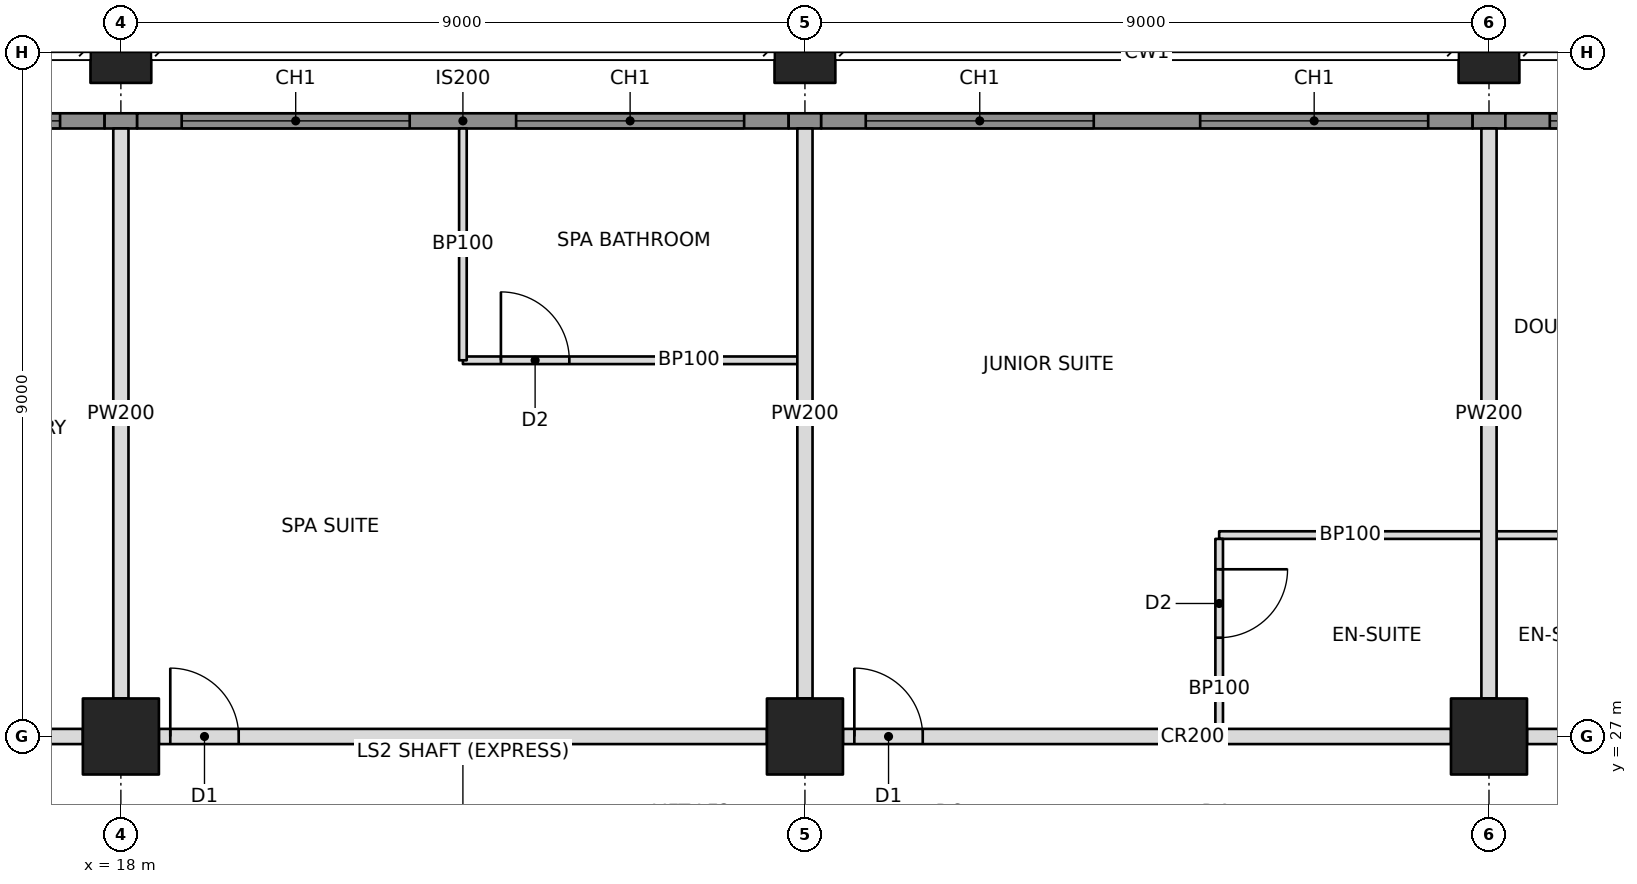
"""IFC4 building model, lengths in metres.
Left out: names, types, materials, properties, quantities, classifications, styles, units other than length and angle.
Written with IfcOpenShell. Run it as: python <this file> out.ifc"""

import sys

from ifc_helpers import new_model, si_unit, direction, frame, frame_2d, origin, origin_2d, place, context, subcontext, project, spatial, rectangle, hollow_rectangle, extrude, element, fill, save


model = new_model("IFC4")
c1 = context("Model", 3, precision=1e-05, world=origin(), true_north=direction((0.0, 1.0)))
c2 = subcontext(c1, "Body", "Model", "MODEL_VIEW")
j1 = project(units=[si_unit("LENGTHUNIT", "METRE"), si_unit("PLANEANGLEUNIT", "RADIAN")], contexts=[c1])
p1 = place(None, origin())
s1 = spatial("IfcSite", under=j1, at=p1, CompositionType="ELEMENT")
p2 = place(p1, origin())
s2 = spatial("IfcBuilding", under=s1, at=p2, CompositionType="ELEMENT")
p3 = place(p2, frame((0.0, 0.0, 85.8)))
s3 = spatial("IfcBuildingStorey", under=s2, at=p3, CompositionType="ELEMENT", Elevation=85.8)
p4 = place(p3, frame((18.0, 27.0, 0.0), z_axis=(0.0, 0.0, 1.0), x_axis=(1.0, 0.0, 0.0)))
e1 = element("IfcColumn", 1, at=p4, inside=s3, PredefinedType="COLUMN", context=c2, shape_type="SweptSolid", body=[
    extrude(hollow_rectangle(XDim=1.0, YDim=1.0, WallThickness=0.1, at=origin_2d()), origin(), (0.0, 0.0, 1.0), 3.4),
])
p5 = place(p3, frame((18.0, 36.0, 0.0), z_axis=(0.0, 0.0, 1.0), x_axis=(1.0, 0.0, 0.0)))
e2 = element("IfcColumn", 2, at=p5, inside=s3, PredefinedType="COLUMN", context=c2, shape_type="SweptSolid", body=[
    extrude(hollow_rectangle(XDim=0.8, YDim=0.8, WallThickness=0.07, at=origin_2d()), origin(), (0.0, 0.0, 1.0), 3.4),
])
p6 = place(p3, frame((27.0, 27.0, 0.0), z_axis=(0.0, 0.0, 1.0), x_axis=(1.0, 0.0, 0.0)))
e3 = element("IfcColumn", 3, at=p6, inside=s3, PredefinedType="COLUMN", context=c2, shape_type="SweptSolid", body=[
    extrude(hollow_rectangle(XDim=1.0, YDim=1.0, WallThickness=0.1, at=origin_2d()), origin(), (0.0, 0.0, 1.0), 3.4),
])
p7 = place(p3, frame((27.0, 36.0, 0.0), z_axis=(0.0, 0.0, 1.0), x_axis=(1.0, 0.0, 0.0)))
e4 = element("IfcColumn", 4, at=p7, inside=s3, PredefinedType="COLUMN", context=c2, shape_type="SweptSolid", body=[
    extrude(hollow_rectangle(XDim=0.8, YDim=0.8, WallThickness=0.07, at=origin_2d()), origin(), (0.0, 0.0, 1.0), 3.4),
])
p8 = place(p3, frame((36.0, 27.0, 0.0), z_axis=(0.0, 0.0, 1.0), x_axis=(1.0, 0.0, 0.0)))
e5 = element("IfcColumn", 5, at=p8, inside=s3, PredefinedType="COLUMN", context=c2, shape_type="SweptSolid", body=[
    extrude(hollow_rectangle(XDim=1.0, YDim=1.0, WallThickness=0.1, at=origin_2d()), origin(), (0.0, 0.0, 1.0), 3.4),
])
p9 = place(p3, frame((36.0, 36.0, 0.0), z_axis=(0.0, 0.0, 1.0), x_axis=(1.0, 0.0, 0.0)))
e6 = element("IfcColumn", 6, at=p9, inside=s3, PredefinedType="COLUMN", context=c2, shape_type="SweptSolid", body=[
    extrude(hollow_rectangle(XDim=0.8, YDim=0.8, WallThickness=0.07, at=origin_2d()), origin(), (0.0, 0.0, 1.0), 3.4),
])
p10 = place(p3, frame((9.5, 27.0, 0.0), z_axis=(0.0, 0.0, 1.0), x_axis=(1.0, 0.0, 0.0)))
e7 = element("IfcWall", 7, at=p10, inside=s3, PredefinedType="PARTITIONING", context=c2, shape_type="SweptSolid", body=[
    extrude(rectangle(XDim=8.0, YDim=0.2, at=frame_2d((4.0, 0.0))), origin(), (0.0, 0.0, 1.0), 2.21),
])
p11 = place(p10, frame((2.85, 0.0, 0.0)))
e8 = element("IfcOpeningElement", 8, at=p11, cuts=e7, PredefinedType="OPENING", context=c2, shape_type="SweptSolid", body=[
    extrude(rectangle(XDim=0.9, YDim=2.1, at=frame_2d((0.45, 1.05))), frame((0.0, 0.11, 0.0), z_axis=(0.0, -1.0, 0.0), x_axis=(1.0, 0.0, 0.0)), (0.0, 0.0, 1.0), 0.22),
])
p12 = place(p10, frame((4.25, 0.0, 0.0)))
e9 = element("IfcOpeningElement", 9, at=p12, cuts=e7, PredefinedType="OPENING", context=c2, shape_type="SweptSolid", body=[
    extrude(rectangle(XDim=1.0, YDim=2.1, at=frame_2d((0.5, 1.05))), frame((0.0, 0.11, 0.0), z_axis=(0.0, -1.0, 0.0), x_axis=(1.0, 0.0, 0.0)), (0.0, 0.0, 1.0), 0.22),
])
p13 = place(p3, frame((18.5, 27.0, 0.0), z_axis=(0.0, 0.0, 1.0), x_axis=(1.0, 0.0, 0.0)))
e10 = element("IfcWall", 10, at=p13, inside=s3, PredefinedType="PARTITIONING", context=c2, shape_type="SweptSolid", body=[
    extrude(rectangle(XDim=8.0, YDim=0.2, at=frame_2d((4.0, 0.0))), origin(), (0.0, 0.0, 1.0), 2.21),
])
p14 = place(p13, frame((0.15, 0.0, 0.0)))
e11 = element("IfcOpeningElement", 11, at=p14, cuts=e10, PredefinedType="OPENING", context=c2, shape_type="SweptSolid", body=[
    extrude(rectangle(XDim=0.9, YDim=2.1, at=frame_2d((0.45, 1.05))), frame((0.0, 0.11, 0.0), z_axis=(0.0, -1.0, 0.0), x_axis=(1.0, 0.0, 0.0)), (0.0, 0.0, 1.0), 0.22),
])
p15 = place(p3, frame((27.5, 27.0, 0.0), z_axis=(0.0, 0.0, 1.0), x_axis=(1.0, 0.0, 0.0)))
e12 = element("IfcWall", 12, at=p15, inside=s3, PredefinedType="PARTITIONING", context=c2, shape_type="SweptSolid", body=[
    extrude(rectangle(XDim=8.0, YDim=0.2, at=frame_2d((4.0, 0.0))), origin(), (0.0, 0.0, 1.0), 2.21),
])
p16 = place(p15, frame((0.15, 0.0, 0.0)))
e13 = element("IfcOpeningElement", 13, at=p16, cuts=e12, PredefinedType="OPENING", context=c2, shape_type="SweptSolid", body=[
    extrude(rectangle(XDim=0.9, YDim=2.1, at=frame_2d((0.45, 1.05))), frame((0.0, 0.11, 0.0), z_axis=(0.0, -1.0, 0.0), x_axis=(1.0, 0.0, 0.0)), (0.0, 0.0, 1.0), 0.22),
])
p17 = place(p3, frame((36.5, 27.0, 0.0), z_axis=(0.0, 0.0, 1.0), x_axis=(1.0, 0.0, 0.0)))
e14 = element("IfcWall", 14, at=p17, inside=s3, PredefinedType="PARTITIONING", context=c2, shape_type="SweptSolid", body=[
    extrude(rectangle(XDim=8.0, YDim=0.2, at=frame_2d((4.0, 0.0))), origin(), (0.0, 0.0, 1.0), 2.21),
])
p18 = place(p17, frame((2.85, 0.0, 0.0)))
e15 = element("IfcOpeningElement", 15, at=p18, cuts=e14, PredefinedType="OPENING", context=c2, shape_type="SweptSolid", body=[
    extrude(rectangle(XDim=0.9, YDim=2.1, at=frame_2d((0.45, 1.05))), frame((0.0, 0.11, 0.0), z_axis=(0.0, -1.0, 0.0), x_axis=(1.0, 0.0, 0.0)), (0.0, 0.0, 1.0), 0.22),
])
p19 = place(p17, frame((4.25, 0.0, 0.0)))
e16 = element("IfcOpeningElement", 16, at=p19, cuts=e14, PredefinedType="OPENING", context=c2, shape_type="SweptSolid", body=[
    extrude(rectangle(XDim=0.9, YDim=2.1, at=frame_2d((0.45, 1.05))), frame((0.0, 0.11, 0.0), z_axis=(0.0, -1.0, 0.0), x_axis=(1.0, 0.0, 0.0)), (0.0, 0.0, 1.0), 0.22),
])
for number, where, z_axis, x_axis in (
    (17, (18.0, 27.5, 0.0), (0.0, 0.0, 1.0), (0.0, 1.0, 0.0)),
    (18, (27.0, 27.5, 0.0), (0.0, 0.0, 1.0), (0.0, 1.0, 0.0)),
):
    element("IfcWall", number, at=place(p3, frame(where, z_axis=z_axis, x_axis=x_axis)), inside=s3, PredefinedType="PARTITIONING", context=c2, shape_type="SweptSolid", body=[
        extrude(rectangle(XDim=7.5, YDim=0.2, at=frame_2d((3.75, 0.0))), origin(), (0.0, 0.0, 1.0), 2.203),
    ])
p20 = place(p3, frame((36.0, 27.5, 0.0), z_axis=(0.0, 0.0, 1.0), x_axis=(0.0, 1.0, 0.0)))
e19 = element("IfcWall", 19, at=p20, inside=s3, PredefinedType="PARTITIONING", context=c2, shape_type="SweptSolid", body=[
    extrude(rectangle(XDim=7.5, YDim=0.2, at=frame_2d((3.75, 0.0))), origin(), (0.0, 0.0, 1.0), 2.21),
])
p21 = place(p3, frame((22.5, 31.95, 0.0), z_axis=(0.0, 0.0, 1.0), x_axis=(1.0, 0.0, 0.0)))
e20 = element("IfcWall", 20, at=p21, inside=s3, PredefinedType="PARTITIONING", context=c2, shape_type="SweptSolid", body=[
    extrude(rectangle(XDim=4.4, YDim=0.1, at=frame_2d((2.2, 0.0))), origin(), (0.0, 0.0, 1.0), 2.202),
])
p22 = place(p21, frame((0.5, 0.0, 0.0)))
e21 = element("IfcOpeningElement", 21, at=p22, cuts=e20, PredefinedType="OPENING", context=c2, shape_type="SweptSolid", body=[
    extrude(rectangle(XDim=0.9, YDim=2.1, at=frame_2d((0.45, 1.05))), frame((0.0, 0.06, 0.0), z_axis=(0.0, -1.0, 0.0), x_axis=(1.0, 0.0, 0.0)), (0.0, 0.0, 1.0), 0.12),
])
p23 = place(p3, frame((22.5, 31.95, 0.0), z_axis=(0.0, 0.0, 1.0), x_axis=(0.0, 1.0, 0.0)))
e22 = element("IfcWall", 22, at=p23, inside=s3, PredefinedType="PARTITIONING", context=c2, shape_type="SweptSolid", body=[
    extrude(rectangle(XDim=3.05, YDim=0.1, at=frame_2d((1.525, 0.0))), origin(), (0.0, 0.0, 1.0), 2.542),
])
p24 = place(p3, frame((32.45, 29.65, 0.0), z_axis=(0.0, 0.0, 1.0), x_axis=(1.0, 0.0, 0.0)))
e23 = element("IfcWall", 23, at=p24, inside=s3, PredefinedType="PARTITIONING", context=c2, shape_type="SweptSolid", body=[
    extrude(rectangle(XDim=3.45, YDim=0.1, at=frame_2d((1.725, 0.0))), origin(), (0.0, 0.0, 1.0), 2.21),
])
p25 = place(p3, frame((32.45, 27.1, 0.0), z_axis=(0.0, 0.0, 1.0), x_axis=(0.0, 1.0, 0.0)))
e24 = element("IfcWall", 24, at=p25, inside=s3, PredefinedType="PARTITIONING", context=c2, shape_type="SweptSolid", body=[
    extrude(rectangle(XDim=2.5, YDim=0.1, at=frame_2d((1.25, 0.0))), origin(), (0.0, 0.0, 1.0), 2.21),
])
p26 = place(p25, frame((1.2, 0.0, 0.0)))
e25 = element("IfcOpeningElement", 25, at=p26, cuts=e24, PredefinedType="OPENING", context=c2, shape_type="SweptSolid", body=[
    extrude(rectangle(XDim=0.9, YDim=2.1, at=frame_2d((0.45, 1.05))), frame((0.0, 0.06, 0.0), z_axis=(0.0, -1.0, 0.0), x_axis=(1.0, 0.0, 0.0)), (0.0, 0.0, 1.0), 0.12),
])
p27 = place(p3, frame((36.1, 29.65, 0.0), z_axis=(0.0, 0.0, 1.0), x_axis=(1.0, 0.0, 0.0)))
e26 = element("IfcWall", 26, at=p27, inside=s3, PredefinedType="PARTITIONING", context=c2, shape_type="SweptSolid", body=[
    extrude(rectangle(XDim=2.95, YDim=0.1, at=frame_2d((1.475, 0.0))), origin(), (0.0, 0.0, 1.0), 2.21),
])
p28 = place(p3, frame((9.215, 35.1, 0.0), z_axis=(0.0, 0.0, 1.0), x_axis=(1.0, 0.0, 0.0)))
e27 = element("IfcWall", 27, at=p28, inside=s3, PredefinedType="SOLIDWALL", context=c2, shape_type="SweptSolid", body=[
    extrude(rectangle(XDim=8.571, YDim=0.2, at=frame_2d((4.285, 0.0))), origin(), (0.0, 0.0, 1.0), 3.15),
])
p29 = place(p28, frame((0.585, 0.0, 0.6)))
e28 = element("IfcOpeningElement", 28, at=p29, cuts=e27, PredefinedType="OPENING", context=c2, shape_type="SweptSolid", body=[
    extrude(rectangle(XDim=3.0, YDim=2.2, at=frame_2d((1.5, 1.1))), frame((0.0, 0.11, 0.0), z_axis=(0.0, -1.0, 0.0), x_axis=(1.0, 0.0, 0.0)), (0.0, 0.0, 1.0), 0.22),
])
p30 = place(p28, frame((4.985, 0.0, 0.6)))
e29 = element("IfcOpeningElement", 29, at=p30, cuts=e27, PredefinedType="OPENING", context=c2, shape_type="SweptSolid", body=[
    extrude(rectangle(XDim=3.0, YDim=2.2, at=frame_2d((1.5, 1.1))), frame((0.0, 0.11, 0.0), z_axis=(0.0, -1.0, 0.0), x_axis=(1.0, 0.0, 0.0)), (0.0, 0.0, 1.0), 0.22),
])
p31 = place(p3, frame((17.786, 35.1, 0.0), z_axis=(0.0, 0.0, 1.0), x_axis=(1.0, 0.0, 0.0)))
e30 = element("IfcWall", 30, at=p31, inside=s3, PredefinedType="SOLIDWALL", context=c2, shape_type="SweptSolid", body=[
    extrude(rectangle(XDim=0.428, YDim=0.2, at=frame_2d((0.214, 0.0))), origin(), (0.0, 0.0, 1.0), 2.202),
])
p32 = place(p3, frame((18.214, 35.1, 0.0), z_axis=(0.0, 0.0, 1.0), x_axis=(1.0, 0.0, 0.0)))
e31 = element("IfcWall", 31, at=p32, inside=s3, PredefinedType="SOLIDWALL", context=c2, shape_type="SweptSolid", body=[
    extrude(rectangle(XDim=8.572, YDim=0.2, at=frame_2d((4.286, 0.0))), origin(), (0.0, 0.0, 1.0), 3.15),
])
p33 = place(p32, frame((0.586, 0.0, 0.6)))
e32 = element("IfcOpeningElement", 32, at=p33, cuts=e31, PredefinedType="OPENING", context=c2, shape_type="SweptSolid", body=[
    extrude(rectangle(XDim=3.0, YDim=2.2, at=frame_2d((1.5, 1.1))), frame((0.0, 0.11, 0.0), z_axis=(0.0, -1.0, 0.0), x_axis=(1.0, 0.0, 0.0)), (0.0, 0.0, 1.0), 0.22),
])
p34 = place(p32, frame((4.986, 0.0, 0.6)))
e33 = element("IfcOpeningElement", 33, at=p34, cuts=e31, PredefinedType="OPENING", context=c2, shape_type="SweptSolid", body=[
    extrude(rectangle(XDim=3.0, YDim=2.2, at=frame_2d((1.5, 1.1))), frame((0.0, 0.11, 0.0), z_axis=(0.0, -1.0, 0.0), x_axis=(1.0, 0.0, 0.0)), (0.0, 0.0, 1.0), 0.22),
])
p35 = place(p3, frame((26.786, 35.1, 0.0), z_axis=(0.0, 0.0, 1.0), x_axis=(1.0, 0.0, 0.0)))
e34 = element("IfcWall", 34, at=p35, inside=s3, PredefinedType="SOLIDWALL", context=c2, shape_type="SweptSolid", body=[
    extrude(rectangle(XDim=0.428, YDim=0.2, at=frame_2d((0.214, 0.0))), origin(), (0.0, 0.0, 1.0), 2.202),
])
p36 = place(p3, frame((27.214, 35.1, 0.0), z_axis=(0.0, 0.0, 1.0), x_axis=(1.0, 0.0, 0.0)))
e35 = element("IfcWall", 35, at=p36, inside=s3, PredefinedType="SOLIDWALL", context=c2, shape_type="SweptSolid", body=[
    extrude(rectangle(XDim=8.571, YDim=0.2, at=frame_2d((4.285, 0.0))), origin(), (0.0, 0.0, 1.0), 3.15),
])
p37 = place(p36, frame((0.586, 0.0, 0.6)))
e36 = element("IfcOpeningElement", 36, at=p37, cuts=e35, PredefinedType="OPENING", context=c2, shape_type="SweptSolid", body=[
    extrude(rectangle(XDim=3.0, YDim=2.2, at=frame_2d((1.5, 1.1))), frame((0.0, 0.11, 0.0), z_axis=(0.0, -1.0, 0.0), x_axis=(1.0, 0.0, 0.0)), (0.0, 0.0, 1.0), 0.22),
])
p38 = place(p36, frame((4.986, 0.0, 0.6)))
e37 = element("IfcOpeningElement", 37, at=p38, cuts=e35, PredefinedType="OPENING", context=c2, shape_type="SweptSolid", body=[
    extrude(rectangle(XDim=3.0, YDim=2.2, at=frame_2d((1.5, 1.1))), frame((0.0, 0.11, 0.0), z_axis=(0.0, -1.0, 0.0), x_axis=(1.0, 0.0, 0.0)), (0.0, 0.0, 1.0), 0.22),
])
p39 = place(p3, frame((35.785, 35.1, 0.0), z_axis=(0.0, 0.0, 1.0), x_axis=(1.0, 0.0, 0.0)))
e38 = element("IfcWall", 38, at=p39, inside=s3, PredefinedType="SOLIDWALL", context=c2, shape_type="SweptSolid", body=[
    extrude(rectangle(XDim=0.431, YDim=0.2, at=frame_2d((0.215, 0.0))), origin(), (0.0, 0.0, 1.0), 2.21),
])
p40 = place(p3, frame((36.215, 35.1, 0.0), z_axis=(0.0, 0.0, 1.0), x_axis=(1.0, 0.0, 0.0)))
e39 = element("IfcWall", 39, at=p40, inside=s3, PredefinedType="SOLIDWALL", context=c2, shape_type="SweptSolid", body=[
    extrude(rectangle(XDim=8.569, YDim=0.2, at=frame_2d((4.285, 0.0))), origin(), (0.0, 0.0, 1.0), 3.15),
])
p41 = place(p40, frame((0.585, 0.0, 0.6)))
e40 = element("IfcOpeningElement", 40, at=p41, cuts=e39, PredefinedType="OPENING", context=c2, shape_type="SweptSolid", body=[
    extrude(rectangle(XDim=3.0, YDim=2.2, at=frame_2d((1.5, 1.1))), frame((0.0, 0.11, 0.0), z_axis=(0.0, -1.0, 0.0), x_axis=(1.0, 0.0, 0.0)), (0.0, 0.0, 1.0), 0.22),
])
p42 = place(p40, frame((4.985, 0.0, 0.6)))
e41 = element("IfcOpeningElement", 41, at=p42, cuts=e39, PredefinedType="OPENING", context=c2, shape_type="SweptSolid", body=[
    extrude(rectangle(XDim=3.0, YDim=2.2, at=frame_2d((1.5, 1.1))), frame((0.0, 0.11, 0.0), z_axis=(0.0, -1.0, 0.0), x_axis=(1.0, 0.0, 0.0)), (0.0, 0.0, 1.0), 0.22),
])
p43 = place(p30, origin())
e42 = element("IfcWindow", 42, at=p43, inside=s3, PartitioningType="TRIPLE_PANEL_VERTICAL", PredefinedType="WINDOW", context=c2, shape_type="SweptSolid", body=[
    extrude(rectangle(XDim=3.0, YDim=2.2, at=frame_2d((1.5, 1.1))), frame((0.0, 0.03, 0.0), z_axis=(0.0, -1.0, 0.0), x_axis=(1.0, 0.0, 0.0)), (0.0, 0.0, 1.0), 0.06),
])
fill(e29, e42)
p44 = place(p33, origin())
e43 = element("IfcWindow", 43, at=p44, inside=s3, PartitioningType="TRIPLE_PANEL_VERTICAL", PredefinedType="WINDOW", context=c2, shape_type="SweptSolid", body=[
    extrude(rectangle(XDim=3.0, YDim=2.2, at=frame_2d((1.5, 1.1))), frame((0.0, 0.03, 0.0), z_axis=(0.0, -1.0, 0.0), x_axis=(1.0, 0.0, 0.0)), (0.0, 0.0, 1.0), 0.06),
])
fill(e32, e43)
p45 = place(p34, origin())
e44 = element("IfcWindow", 44, at=p45, inside=s3, PartitioningType="TRIPLE_PANEL_VERTICAL", PredefinedType="WINDOW", context=c2, shape_type="SweptSolid", body=[
    extrude(rectangle(XDim=3.0, YDim=2.2, at=frame_2d((1.5, 1.1))), frame((0.0, 0.03, 0.0), z_axis=(0.0, -1.0, 0.0), x_axis=(1.0, 0.0, 0.0)), (0.0, 0.0, 1.0), 0.06),
])
fill(e33, e44)
p46 = place(p37, origin())
e45 = element("IfcWindow", 45, at=p46, inside=s3, PartitioningType="TRIPLE_PANEL_VERTICAL", PredefinedType="WINDOW", context=c2, shape_type="SweptSolid", body=[
    extrude(rectangle(XDim=3.0, YDim=2.2, at=frame_2d((1.5, 1.1))), frame((0.0, 0.03, 0.0), z_axis=(0.0, -1.0, 0.0), x_axis=(1.0, 0.0, 0.0)), (0.0, 0.0, 1.0), 0.06),
])
fill(e36, e45)
p47 = place(p38, origin())
e46 = element("IfcWindow", 46, at=p47, inside=s3, PartitioningType="TRIPLE_PANEL_VERTICAL", PredefinedType="WINDOW", context=c2, shape_type="SweptSolid", body=[
    extrude(rectangle(XDim=3.0, YDim=2.2, at=frame_2d((1.5, 1.1))), frame((0.0, 0.03, 0.0), z_axis=(0.0, -1.0, 0.0), x_axis=(1.0, 0.0, 0.0)), (0.0, 0.0, 1.0), 0.06),
])
fill(e37, e46)
p48 = place(p41, origin())
e47 = element("IfcWindow", 47, at=p48, inside=s3, PartitioningType="TRIPLE_PANEL_VERTICAL", PredefinedType="WINDOW", context=c2, shape_type="SweptSolid", body=[
    extrude(rectangle(XDim=3.0, YDim=2.2, at=frame_2d((1.5, 1.1))), frame((0.0, 0.03, 0.0), z_axis=(0.0, -1.0, 0.0), x_axis=(1.0, 0.0, 0.0)), (0.0, 0.0, 1.0), 0.06),
])
fill(e40, e47)
p49 = place(p22, origin())
e48 = element("IfcDoor", 48, at=p49, inside=s3, OperationType="SINGLE_SWING_LEFT", PredefinedType="DOOR", context=c2, shape_type="SweptSolid", body=[
    extrude(rectangle(XDim=0.9, YDim=2.1, at=frame_2d((0.45, 1.05))), frame((0.0, 0.025, 0.0), z_axis=(0.0, -1.0, 0.0), x_axis=(1.0, 0.0, 0.0)), (0.0, 0.0, 1.0), 0.05),
])
fill(e21, e48)
p50 = place(p14, origin())
e49 = element("IfcDoor", 49, at=p50, inside=s3, OperationType="SINGLE_SWING_LEFT", PredefinedType="DOOR", context=c2, shape_type="SweptSolid", body=[
    extrude(rectangle(XDim=0.9, YDim=2.1, at=frame_2d((0.45, 1.05))), frame((0.0, 0.025, 0.0), z_axis=(0.0, -1.0, 0.0), x_axis=(1.0, 0.0, 0.0)), (0.0, 0.0, 1.0), 0.05),
])
fill(e11, e49)
p51 = place(p26, frame((0.9, 0.0, 0.0), z_axis=(0.0, 0.0, 1.0), x_axis=(-1.0, 0.0, 0.0)))
e50 = element("IfcDoor", 50, at=p51, inside=s3, OperationType="SINGLE_SWING_LEFT", PredefinedType="DOOR", context=c2, shape_type="SweptSolid", body=[
    extrude(rectangle(XDim=0.9, YDim=2.1, at=frame_2d((0.45, 1.05))), frame((0.0, 0.025, 0.0), z_axis=(0.0, -1.0, 0.0), x_axis=(1.0, 0.0, 0.0)), (0.0, 0.0, 1.0), 0.05),
])
fill(e25, e50)
p52 = place(p16, origin())
e51 = element("IfcDoor", 51, at=p52, inside=s3, OperationType="SINGLE_SWING_LEFT", PredefinedType="DOOR", context=c2, shape_type="SweptSolid", body=[
    extrude(rectangle(XDim=0.9, YDim=2.1, at=frame_2d((0.45, 1.05))), frame((0.0, 0.025, 0.0), z_axis=(0.0, -1.0, 0.0), x_axis=(1.0, 0.0, 0.0)), (0.0, 0.0, 1.0), 0.05),
])
fill(e13, e51)
save(model, sys.argv[1])
